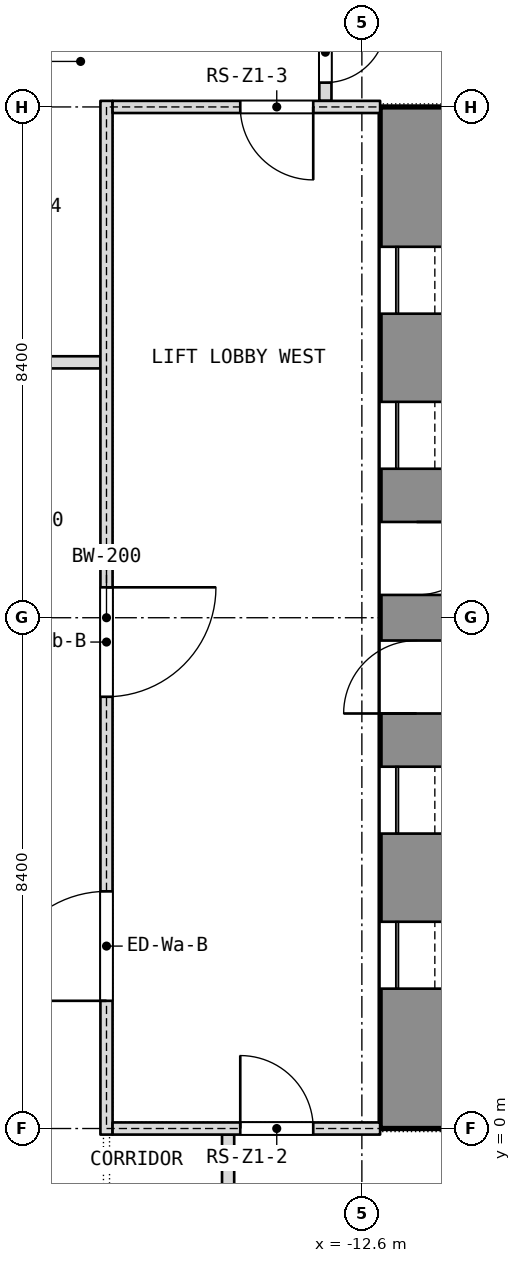
"""IFC4 building model, lengths in metres.
Left out: names, types, materials, properties, quantities, classifications, styles, units other than length and angle.
Written with IfcOpenShell. Run it as: python <this file> out.ifc"""

import sys

from ifc_helpers import new_model, si_unit, direction, frame, frame_2d, origin, place, context, subcontext, project, spatial, rectangle, extrude, element, fill, save


model = new_model("IFC4")
c1 = context("Model", 3, precision=1e-05, world=origin(), true_north=direction((0.0, 1.0)))
c2 = subcontext(c1, "Body", "Model", "MODEL_VIEW")
j1 = project(units=[si_unit("LENGTHUNIT", "METRE"), si_unit("PLANEANGLEUNIT", "RADIAN")], contexts=[c1])
p1 = place(None, origin())
s1 = spatial("IfcSite", under=j1, at=p1, CompositionType="ELEMENT")
p2 = place(p1, origin())
s2 = spatial("IfcBuilding", under=s1, at=p2, CompositionType="ELEMENT")
p3 = place(p2, frame((0.0, 0.0, 36.5)))
s3 = spatial("IfcBuildingStorey", under=s2, at=p3, CompositionType="ELEMENT", Elevation=36.5)
p4 = place(p3, frame((-11.7, 0.0, 0.0), z_axis=(0.0, 0.0, 1.0), x_axis=(0.0, 1.0, 0.0)))
e1 = element("IfcWall", 1, at=p4, inside=s3, PredefinedType="SHEAR", context=c2, shape_type="SweptSolid", body=[
    extrude(rectangle(XDim=16.8, YDim=1.2, at=frame_2d((8.4, 0.0))), origin(), (0.0, 0.0, 1.0), 3.6),
])
p5 = place(p4, frame((2.3, 0.0, 0.0)))
e2 = element("IfcOpeningElement", 2, at=p5, cuts=e1, PredefinedType="OPENING", context=c2, shape_type="SweptSolid", body=[
    extrude(rectangle(XDim=1.1, YDim=2.1, at=frame_2d((0.55, 1.05))), frame((0.0, 0.6, 0.0), z_axis=(0.0, -1.0, 0.0), x_axis=(1.0, 0.0, 0.0)), (0.0, 0.0, 1.0), 1.2),
])
p6 = place(p4, frame((4.85, 0.0, 0.0)))
e3 = element("IfcOpeningElement", 3, at=p6, cuts=e1, PredefinedType="OPENING", context=c2, shape_type="SweptSolid", body=[
    extrude(rectangle(XDim=1.1, YDim=2.1, at=frame_2d((0.55, 1.05))), frame((0.0, 0.6, 0.0), z_axis=(0.0, -1.0, 0.0), x_axis=(1.0, 0.0, 0.0)), (0.0, 0.0, 1.0), 1.2),
])
p7 = place(p4, frame((6.825, 0.0, 0.0)))
e4 = element("IfcOpeningElement", 4, at=p7, cuts=e1, PredefinedType="OPENING", context=c2, shape_type="SweptSolid", body=[
    extrude(rectangle(XDim=1.2, YDim=2.1, at=frame_2d((0.6, 1.05))), frame((0.0, 0.6, 0.0), z_axis=(0.0, -1.0, 0.0), x_axis=(1.0, 0.0, 0.0)), (0.0, 0.0, 1.0), 1.2),
])
p8 = place(p4, frame((13.4, 0.0, 0.0)))
e5 = element("IfcOpeningElement", 5, at=p8, cuts=e1, PredefinedType="OPENING", context=c2, shape_type="SweptSolid", body=[
    extrude(rectangle(XDim=1.1, YDim=2.1, at=frame_2d((0.55, 1.05))), frame((0.0, 0.6, 0.0), z_axis=(0.0, -1.0, 0.0), x_axis=(1.0, 0.0, 0.0)), (0.0, 0.0, 1.0), 1.2),
])
p9 = place(p4, frame((10.85, 0.0, 0.0)))
e6 = element("IfcOpeningElement", 6, at=p9, cuts=e1, PredefinedType="OPENING", context=c2, shape_type="SweptSolid", body=[
    extrude(rectangle(XDim=1.1, YDim=2.1, at=frame_2d((0.55, 1.05))), frame((0.0, 0.6, 0.0), z_axis=(0.0, -1.0, 0.0), x_axis=(1.0, 0.0, 0.0)), (0.0, 0.0, 1.0), 1.2),
])
p10 = place(p4, frame((8.775, 0.0, 0.0)))
e7 = element("IfcOpeningElement", 7, at=p10, cuts=e1, PredefinedType="OPENING", context=c2, shape_type="SweptSolid", body=[
    extrude(rectangle(XDim=1.2, YDim=2.1, at=frame_2d((0.6, 1.05))), frame((0.0, 0.6, 0.0), z_axis=(0.0, -1.0, 0.0), x_axis=(1.0, 0.0, 0.0)), (0.0, 0.0, 1.0), 1.2),
])
p11 = place(p3, frame((-18.0, 12.6, 0.0), z_axis=(0.0, 0.0, 1.0), x_axis=(1.0, 0.0, 0.0)))
e8 = element("IfcWall", 8, at=p11, inside=s3, PredefinedType="PARTITIONING", context=c2, shape_type="SweptSolid", body=[
    extrude(rectangle(XDim=1.1, YDim=0.2, at=frame_2d((0.55, 0.0))), origin(), (0.0, 0.0, 1.0), 3.34),
])
p12 = place(p3, frame((-13.2, 16.9, 0.0), z_axis=(0.0, 0.0, 1.0), x_axis=(0.0, 1.0, 0.0)))
e9 = element("IfcWall", 9, at=p12, inside=s3, PredefinedType="PARTITIONING", context=c2, shape_type="SweptSolid", body=[
    extrude(rectangle(XDim=1.6, YDim=0.2, at=frame_2d((0.8, 0.0))), origin(), (0.0, 0.0, 1.0), 3.34),
])
p13 = place(p12, frame((0.3, 0.0, 0.0)))
e10 = element("IfcOpeningElement", 10, at=p13, cuts=e9, PredefinedType="OPENING", context=c2, shape_type="SweptSolid", body=[
    extrude(rectangle(XDim=1.0, YDim=2.1, at=frame_2d((0.5, 1.05))), frame((0.0, 0.1, 0.0), z_axis=(0.0, -1.0, 0.0), x_axis=(1.0, 0.0, 0.0)), (0.0, 0.0, 1.0), 0.2),
])
p14 = place(p3, frame((-14.8, -1.7, 0.0), z_axis=(0.0, 0.0, 1.0), x_axis=(0.0, 1.0, 0.0)))
e11 = element("IfcWall", 11, at=p14, inside=s3, PredefinedType="PARTITIONING", context=c2, shape_type="SweptSolid", body=[
    extrude(rectangle(XDim=1.6, YDim=0.2, at=frame_2d((0.8, 0.0))), origin(), (0.0, 0.0, 1.0), 3.34),
])
p15 = place(p3, frame((-16.8, -0.1, 0.0), z_axis=(0.0, 0.0, 1.0), x_axis=(0.0, 1.0, 0.0)))
e12 = element("IfcWall", 12, at=p15, inside=s3, PredefinedType="PARTITIONING", context=c2, shape_type="SweptSolid", body=[
    extrude(rectangle(XDim=17.0, YDim=0.2, at=frame_2d((8.5, 0.0))), origin(), (0.0, 0.0, 1.0), 3.34),
])
p16 = place(p15, frame((2.2, 0.0, 0.0)))
e13 = element("IfcOpeningElement", 13, at=p16, cuts=e12, PredefinedType="OPENING", context=c2, shape_type="SweptSolid", body=[
    extrude(rectangle(XDim=1.8, YDim=2.1, at=frame_2d((0.9, 1.05))), frame((0.0, 0.1, 0.0), z_axis=(0.0, -1.0, 0.0), x_axis=(1.0, 0.0, 0.0)), (0.0, 0.0, 1.0), 0.2),
])
p17 = place(p15, frame((7.2, 0.0, 0.0)))
e14 = element("IfcOpeningElement", 14, at=p17, cuts=e12, PredefinedType="OPENING", context=c2, shape_type="SweptSolid", body=[
    extrude(rectangle(XDim=1.8, YDim=2.1, at=frame_2d((0.9, 1.05))), frame((0.0, 0.1, 0.0), z_axis=(0.0, -1.0, 0.0), x_axis=(1.0, 0.0, 0.0)), (0.0, 0.0, 1.0), 0.2),
])
p18 = place(p3, frame((-16.7, 0.0, 0.0), z_axis=(0.0, 0.0, 1.0), x_axis=(1.0, 0.0, 0.0)))
e15 = element("IfcWall", 15, at=p18, inside=s3, PredefinedType="PARTITIONING", context=c2, shape_type="SweptSolid", body=[
    extrude(rectangle(XDim=4.4, YDim=0.2, at=frame_2d((2.2, 0.0))), origin(), (0.0, 0.0, 1.0), 2.84),
])
p19 = place(p18, frame((2.1, 0.0, 0.0)))
e16 = element("IfcOpeningElement", 16, at=p19, cuts=e15, PredefinedType="OPENING", context=c2, shape_type="SweptSolid", body=[
    extrude(rectangle(XDim=1.2, YDim=2.1, at=frame_2d((0.6, 1.05))), frame((0.0, 0.1, 0.0), z_axis=(0.0, -1.0, 0.0), x_axis=(1.0, 0.0, 0.0)), (0.0, 0.0, 1.0), 0.2),
])
p20 = place(p3, frame((-16.7, 16.8, 0.0), z_axis=(0.0, 0.0, 1.0), x_axis=(1.0, 0.0, 0.0)))
e17 = element("IfcWall", 17, at=p20, inside=s3, PredefinedType="PARTITIONING", context=c2, shape_type="SweptSolid", body=[
    extrude(rectangle(XDim=4.4, YDim=0.2, at=frame_2d((2.2, 0.0))), origin(), (0.0, 0.0, 1.0), 2.84),
])
p21 = place(p20, frame((2.1, 0.0, 0.0)))
e18 = element("IfcOpeningElement", 18, at=p21, cuts=e17, PredefinedType="OPENING", context=c2, shape_type="SweptSolid", body=[
    extrude(rectangle(XDim=1.2, YDim=2.1, at=frame_2d((0.6, 1.05))), frame((0.0, 0.1, 0.0), z_axis=(0.0, -1.0, 0.0), x_axis=(1.0, 0.0, 0.0)), (0.0, 0.0, 1.0), 0.2),
])
p22 = place(p13, origin())
e19 = element("IfcDoor", 19, at=p22, inside=s3, OperationType="SINGLE_SWING_RIGHT", PredefinedType="DOOR", context=c2, shape_type="SweptSolid", body=[
    extrude(rectangle(XDim=1.0, YDim=2.1, at=frame_2d((0.5, 1.05))), frame((0.0, 0.025, 0.0), z_axis=(0.0, -1.0, 0.0), x_axis=(1.0, 0.0, 0.0)), (0.0, 0.0, 1.0), 0.05),
])
fill(e10, e19)
p23 = place(p5, origin())
e20 = element("IfcDoor", 20, at=p23, inside=s3, OperationType="SLIDING_TO_LEFT", PredefinedType="DOOR", context=c2, shape_type="SweptSolid", body=[
    extrude(rectangle(XDim=1.1, YDim=2.1, at=frame_2d((0.55, 1.05))), frame((0.0, 0.025, 0.0), z_axis=(0.0, -1.0, 0.0), x_axis=(1.0, 0.0, 0.0)), (0.0, 0.0, 1.0), 0.05),
])
fill(e2, e20)
p24 = place(p6, origin())
e21 = element("IfcDoor", 21, at=p24, inside=s3, OperationType="SLIDING_TO_LEFT", PredefinedType="DOOR", context=c2, shape_type="SweptSolid", body=[
    extrude(rectangle(XDim=1.1, YDim=2.1, at=frame_2d((0.55, 1.05))), frame((0.0, 0.025, 0.0), z_axis=(0.0, -1.0, 0.0), x_axis=(1.0, 0.0, 0.0)), (0.0, 0.0, 1.0), 0.05),
])
fill(e3, e21)
p25 = place(p7, origin())
e22 = element("IfcDoor", 22, at=p25, inside=s3, OperationType="SINGLE_SWING_LEFT", PredefinedType="DOOR", context=c2, shape_type="SweptSolid", body=[
    extrude(rectangle(XDim=1.2, YDim=2.1, at=frame_2d((0.6, 1.05))), frame((0.0, 0.025, 0.0), z_axis=(0.0, -1.0, 0.0), x_axis=(1.0, 0.0, 0.0)), (0.0, 0.0, 1.0), 0.05),
])
fill(e4, e22)
p26 = place(p8, origin())
e23 = element("IfcDoor", 23, at=p26, inside=s3, OperationType="SLIDING_TO_LEFT", PredefinedType="DOOR", context=c2, shape_type="SweptSolid", body=[
    extrude(rectangle(XDim=1.1, YDim=2.1, at=frame_2d((0.55, 1.05))), frame((0.0, 0.025, 0.0), z_axis=(0.0, -1.0, 0.0), x_axis=(1.0, 0.0, 0.0)), (0.0, 0.0, 1.0), 0.05),
])
fill(e5, e23)
p27 = place(p9, origin())
e24 = element("IfcDoor", 24, at=p27, inside=s3, OperationType="SLIDING_TO_LEFT", PredefinedType="DOOR", context=c2, shape_type="SweptSolid", body=[
    extrude(rectangle(XDim=1.1, YDim=2.1, at=frame_2d((0.55, 1.05))), frame((0.0, 0.025, 0.0), z_axis=(0.0, -1.0, 0.0), x_axis=(1.0, 0.0, 0.0)), (0.0, 0.0, 1.0), 0.05),
])
fill(e6, e24)
p28 = place(p10, origin())
e25 = element("IfcDoor", 25, at=p28, inside=s3, OperationType="SINGLE_SWING_LEFT", PredefinedType="DOOR", context=c2, shape_type="SweptSolid", body=[
    extrude(rectangle(XDim=1.2, YDim=2.1, at=frame_2d((0.6, 1.05))), frame((0.0, 0.025, 0.0), z_axis=(0.0, -1.0, 0.0), x_axis=(1.0, 0.0, 0.0)), (0.0, 0.0, 1.0), 0.05),
])
fill(e7, e25)
p29 = place(p16, origin())
e26 = element("IfcDoor", 26, at=p29, inside=s3, OperationType="DOUBLE_DOOR_SINGLE_SWING", PredefinedType="DOOR", context=c2, shape_type="SweptSolid", body=[
    extrude(rectangle(XDim=1.8, YDim=2.1, at=frame_2d((0.9, 1.05))), frame((0.0, 0.025, 0.0), z_axis=(0.0, -1.0, 0.0), x_axis=(1.0, 0.0, 0.0)), (0.0, 0.0, 1.0), 0.05),
])
fill(e13, e26)
p30 = place(p17, origin())
e27 = element("IfcDoor", 27, at=p30, inside=s3, OperationType="DOUBLE_DOOR_SINGLE_SWING", PredefinedType="DOOR", context=c2, shape_type="SweptSolid", body=[
    extrude(rectangle(XDim=1.8, YDim=2.1, at=frame_2d((0.9, 1.05))), frame((0.0, 0.025, 0.0), z_axis=(0.0, -1.0, 0.0), x_axis=(1.0, 0.0, 0.0)), (0.0, 0.0, 1.0), 0.05),
])
fill(e14, e27)
p31 = place(p19, origin())
e28 = element("IfcDoor", 28, at=p31, inside=s3, OperationType="SINGLE_SWING_LEFT", PredefinedType="DOOR", context=c2, shape_type="SweptSolid", body=[
    extrude(rectangle(XDim=1.2, YDim=2.1, at=frame_2d((0.6, 1.05))), frame((0.0, 0.025, 0.0), z_axis=(0.0, -1.0, 0.0), x_axis=(1.0, 0.0, 0.0)), (0.0, 0.0, 1.0), 0.05),
])
fill(e16, e28)
p32 = place(p21, origin())
e29 = element("IfcDoor", 29, at=p32, inside=s3, OperationType="SINGLE_SWING_LEFT", PredefinedType="DOOR", context=c2, shape_type="SweptSolid", body=[
    extrude(rectangle(XDim=1.2, YDim=2.1, at=frame_2d((0.6, 1.05))), frame((0.0, 0.025, 0.0), z_axis=(0.0, -1.0, 0.0), x_axis=(1.0, 0.0, 0.0)), (0.0, 0.0, 1.0), 0.05),
])
fill(e18, e29)
save(model, sys.argv[1])
